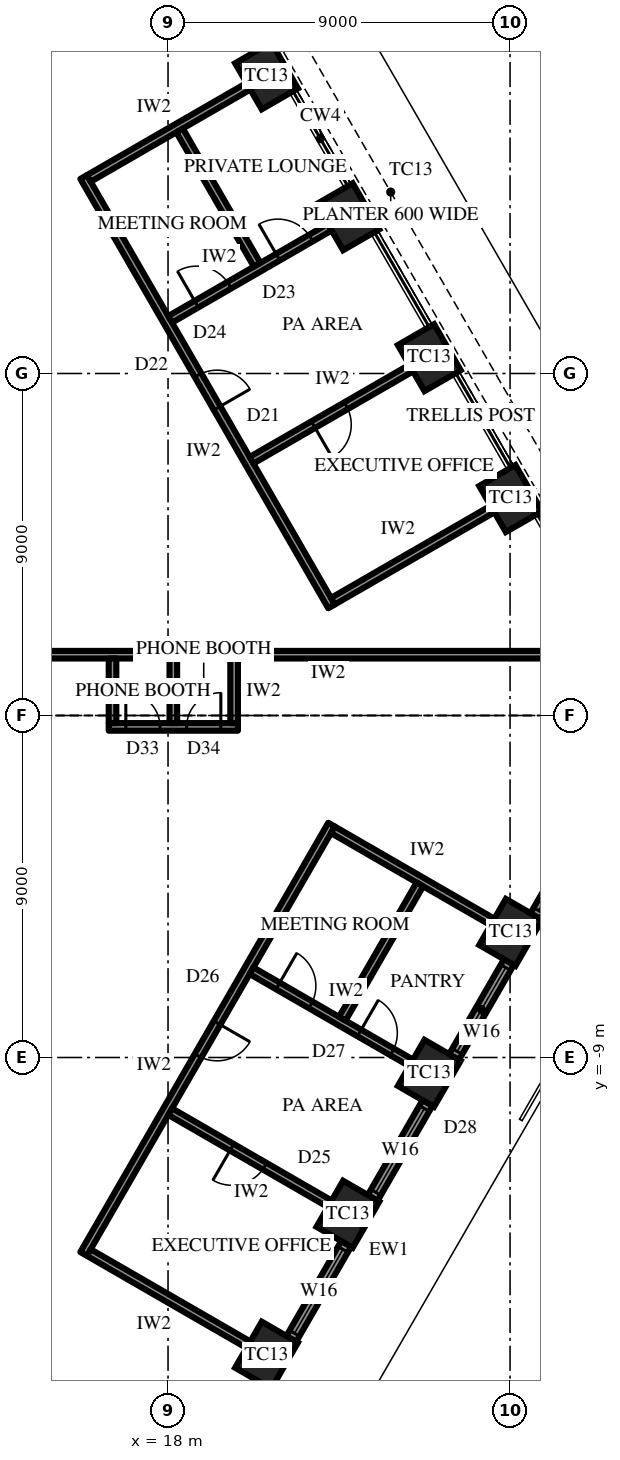
"""IFC4 building model, lengths in metres.
Left out: names, types, materials, properties, quantities, classifications, styles, units other than length and angle.
Written with IfcOpenShell. Run it as: python <this file> out.ifc"""

import sys

from ifc_helpers import new_model, si_unit, direction, frame, frame_2d, origin, origin_2d, place, context, subcontext, project, spatial, rectangle, extrude, element, fill, save


model = new_model("IFC4")
c1 = context("Model", 3, precision=1e-05, world=origin(), true_north=direction((0.0, 1.0)))
c2 = subcontext(c1, "Body", "Model", "MODEL_VIEW")
j1 = project(units=[si_unit("LENGTHUNIT", "METRE"), si_unit("PLANEANGLEUNIT", "RADIAN")], contexts=[c1])
p1 = place(None, origin())
s1 = spatial("IfcSite", under=j1, at=p1, CompositionType="ELEMENT")
p2 = place(p1, origin())
s2 = spatial("IfcBuilding", under=s1, at=p2, CompositionType="ELEMENT")
p3 = place(p2, frame((0.0, 0.0, 315.7)))
s3 = spatial("IfcBuildingStorey", under=s2, at=p3, CompositionType="ELEMENT", Elevation=315.7)
for number, where, z_axis, x_axis in (
    (1, (27.015, 5.708, 0.0), (0.0, 0.0, 1.0), (-0.5, 0.866, 0.0)),
    (2, (24.874, 9.417, 0.0), (0.0, 0.0, 1.0), (-0.5, 0.866, 0.0)),
    (3, (22.733, 13.125, 0.0), (0.0, 0.0, 1.0), (-0.5, 0.866, 0.0)),
    (4, (20.592, 16.833, 0.0), (0.0, 0.0, 1.0), (-0.5, 0.866, 0.0)),
    (5, (20.592, -16.833, 0.0), (0.0, 0.0, 1.0), (0.5, 0.866, 0.0)),
    (6, (22.733, -13.125, 0.0), (0.0, 0.0, 1.0), (0.5, 0.866, 0.0)),
    (7, (24.874, -9.417, 0.0), (0.0, 0.0, 1.0), (0.5, 0.866, 0.0)),
    (8, (27.015, -5.708, 0.0), (0.0, 0.0, 1.0), (0.5, 0.866, 0.0)),
):
    element("IfcColumn", number, at=place(p3, frame(where, z_axis=z_axis, x_axis=x_axis)), inside=s3, PredefinedType="COLUMN", context=c2, shape_type="SweptSolid", body=[
        extrude(rectangle(XDim=1.4, YDim=1.1, at=origin_2d()), origin(), (0.0, 0.0, 1.0), 4.2),
    ])
p4 = place(p3, frame((16.613, -24.425, 0.0), z_axis=(0.0, 0.0, 1.0), x_axis=(0.499997191038, 0.866027025533, 0.0)))
e9 = element("IfcWall", 9, at=p4, inside=s3, PredefinedType="SOLIDWALL", context=c2, shape_type="SweptSolid", body=[
    extrude(rectangle(XDim=25.692, YDim=0.3, at=frame_2d((12.846, 0.0))), origin(), (0.0, 0.0, 1.0), 2.0),
])
p5 = place(p4, frame((0.866, 0.0, 0.6)))
e10 = element("IfcOpeningElement", 10, at=p5, cuts=e9, PredefinedType="OPENING", context=c2, shape_type="SweptSolid", body=[
    extrude(rectangle(XDim=2.55, YDim=1.15, at=frame_2d((1.275, 0.575))), frame((0.0, 0.16, 0.0), z_axis=(0.0, -1.0, 0.0), x_axis=(1.0, 0.0, 0.0)), (0.0, 0.0, 1.0), 0.32),
])
p6 = place(p4, frame((5.148, 0.0, 0.6)))
e11 = element("IfcOpeningElement", 11, at=p6, cuts=e9, PredefinedType="OPENING", context=c2, shape_type="SweptSolid", body=[
    extrude(rectangle(XDim=2.55, YDim=1.15, at=frame_2d((1.275, 0.575))), frame((0.0, 0.16, 0.0), z_axis=(0.0, -1.0, 0.0), x_axis=(1.0, 0.0, 0.0)), (0.0, 0.0, 1.0), 0.32),
])
p7 = place(p4, frame((9.43, 0.0, 0.6)))
e12 = element("IfcOpeningElement", 12, at=p7, cuts=e9, PredefinedType="OPENING", context=c2, shape_type="SweptSolid", body=[
    extrude(rectangle(XDim=2.55, YDim=1.15, at=frame_2d((1.275, 0.575))), frame((0.0, 0.16, 0.0), z_axis=(0.0, -1.0, 0.0), x_axis=(1.0, 0.0, 0.0)), (0.0, 0.0, 1.0), 0.32),
])
p8 = place(p4, frame((13.712, 0.0, 0.6)))
e13 = element("IfcOpeningElement", 13, at=p8, cuts=e9, PredefinedType="OPENING", context=c2, shape_type="SweptSolid", body=[
    extrude(rectangle(XDim=2.55, YDim=1.15, at=frame_2d((1.275, 0.575))), frame((0.0, 0.16, 0.0), z_axis=(0.0, -1.0, 0.0), x_axis=(1.0, 0.0, 0.0)), (0.0, 0.0, 1.0), 0.32),
])
p9 = place(p4, frame((17.994, 0.0, 0.6)))
e14 = element("IfcOpeningElement", 14, at=p9, cuts=e9, PredefinedType="OPENING", context=c2, shape_type="SweptSolid", body=[
    extrude(rectangle(XDim=2.55, YDim=1.15, at=frame_2d((1.275, 0.575))), frame((0.0, 0.16, 0.0), z_axis=(0.0, -1.0, 0.0), x_axis=(1.0, 0.0, 0.0)), (0.0, 0.0, 1.0), 0.32),
])
p10 = place(p4, frame((22.276, 0.0, 0.6)))
e15 = element("IfcOpeningElement", 15, at=p10, cuts=e9, PredefinedType="OPENING", context=c2, shape_type="SweptSolid", body=[
    extrude(rectangle(XDim=2.55, YDim=1.15, at=frame_2d((1.275, 0.575))), frame((0.0, 0.16, 0.0), z_axis=(0.0, -1.0, 0.0), x_axis=(1.0, 0.0, 0.0)), (0.0, 0.0, 1.0), 0.32),
])
p11 = place(p3, frame((22.302, 2.872, 0.0), z_axis=(0.0, 0.0, 1.0), x_axis=(-0.499999460936, 0.866025715013, 0.0)))
e16 = element("IfcWall", 16, at=p11, inside=s3, PredefinedType="PARTITIONING", context=c2, shape_type="SweptSolid", body=[
    extrude(rectangle(XDim=13.046, YDim=0.2, at=frame_2d((6.523, 0.0))), origin(), (0.0, 0.0, 1.0), 4.0),
])
p12 = place(p11, frame((6.023, 0.0, 0.0)))
e17 = element("IfcOpeningElement", 17, at=p12, cuts=e16, PredefinedType="OPENING", context=c2, shape_type="SweptSolid", body=[
    extrude(rectangle(XDim=1.0, YDim=2.2, at=frame_2d((0.5, 1.1))), frame((0.0, 0.11, 0.0), z_axis=(0.0, -1.0, 0.0), x_axis=(1.0, 0.0, 0.0)), (0.0, 0.0, 1.0), 0.22),
])
p13 = place(p3, frame((22.339, 3.008, 0.0), z_axis=(0.0, 0.0, 1.0), x_axis=(0.866019606374, 0.500010041276, 0.0)))
e18 = element("IfcWall", 18, at=p13, inside=s3, PredefinedType="PARTITIONING", context=c2, shape_type="SweptSolid", body=[
    extrude(rectangle(XDim=4.85, YDim=0.2, at=frame_2d((2.425, 0.0))), origin(), (0.0, 0.0, 1.0), 3.082),
])
p14 = place(p3, frame((20.198, 6.717, 0.0), z_axis=(0.0, 0.0, 1.0), x_axis=(0.866019606374, 0.500010041276, 0.0)))
e19 = element("IfcWall", 19, at=p14, inside=s3, PredefinedType="PARTITIONING", context=c2, shape_type="SweptSolid", body=[
    extrude(rectangle(XDim=4.85, YDim=0.2, at=frame_2d((2.425, 0.0))), origin(), (0.0, 0.0, 1.0), 2.992),
])
p15 = place(p14, frame((1.875, 0.0, 0.0)))
e20 = element("IfcOpeningElement", 20, at=p15, cuts=e19, PredefinedType="OPENING", context=c2, shape_type="SweptSolid", body=[
    extrude(rectangle(XDim=1.0, YDim=2.2, at=frame_2d((0.5, 1.1))), frame((0.0, 0.11, 0.0), z_axis=(0.0, -1.0, 0.0), x_axis=(1.0, 0.0, 0.0)), (0.0, 0.0, 1.0), 0.22),
])
p16 = place(p3, frame((18.057, 10.425, 0.0), z_axis=(0.0, 0.0, 1.0), x_axis=(0.866019606374, 0.500010041276, 0.0)))
e21 = element("IfcWall", 21, at=p16, inside=s3, PredefinedType="PARTITIONING", context=c2, shape_type="SweptSolid", body=[
    extrude(rectangle(XDim=4.85, YDim=0.2, at=frame_2d((2.425, 0.0))), origin(), (0.0, 0.0, 1.0), 3.082),
])
p17 = place(p16, frame((0.8, 0.0, 0.0)))
e22 = element("IfcOpeningElement", 22, at=p17, cuts=e21, PredefinedType="OPENING", context=c2, shape_type="SweptSolid", body=[
    extrude(rectangle(XDim=1.0, YDim=2.2, at=frame_2d((0.5, 1.1))), frame((0.0, 0.11, 0.0), z_axis=(0.0, -1.0, 0.0), x_axis=(1.0, 0.0, 0.0)), (0.0, 0.0, 1.0), 0.22),
])
p18 = place(p16, frame((3.275, 0.0, 0.0)))
e23 = element("IfcOpeningElement", 23, at=p18, cuts=e21, PredefinedType="OPENING", context=c2, shape_type="SweptSolid", body=[
    extrude(rectangle(XDim=1.0, YDim=2.2, at=frame_2d((0.5, 1.1))), frame((0.0, 0.11, 0.0), z_axis=(0.0, -1.0, 0.0), x_axis=(1.0, 0.0, 0.0)), (0.0, 0.0, 1.0), 0.22),
])
p19 = place(p3, frame((15.916, 14.133, 0.0), z_axis=(0.0, 0.0, 1.0), x_axis=(0.866032190624, 0.499988244665, 0.0)))
e24 = element("IfcWall", 24, at=p19, inside=s3, PredefinedType="PARTITIONING", context=c2, shape_type="SweptSolid", body=[
    extrude(rectangle(XDim=4.85, YDim=0.2, at=frame_2d((2.425, 0.0))), origin(), (0.0, 0.0, 1.0), 3.082),
])
p20 = place(p3, frame((20.345, 11.862, 0.0), z_axis=(0.0, 0.0, 1.0), x_axis=(-0.499998569178, 0.866026229868, 0.0)))
e25 = element("IfcWall", 25, at=p20, inside=s3, PredefinedType="PARTITIONING", context=c2, shape_type="SweptSolid", body=[
    extrude(rectangle(XDim=4.082, YDim=0.2, at=frame_2d((2.041, 0.0))), origin(), (0.0, 0.0, 1.0), 4.0),
])
p21 = place(p3, frame((15.779, -14.17, 0.0), z_axis=(0.0, 0.0, 1.0), x_axis=(0.499999460936, 0.866025715013, 0.0)))
e26 = element("IfcWall", 26, at=p21, inside=s3, PredefinedType="PARTITIONING", context=c2, shape_type="SweptSolid", body=[
    extrude(rectangle(XDim=13.046, YDim=0.2, at=frame_2d((6.523, 0.0))), origin(), (0.0, 0.0, 1.0), 4.0),
])
p22 = place(p21, frame((6.023, 0.0, 0.0)))
e27 = element("IfcOpeningElement", 27, at=p22, cuts=e26, PredefinedType="OPENING", context=c2, shape_type="SweptSolid", body=[
    extrude(rectangle(XDim=1.0, YDim=2.2, at=frame_2d((0.5, 1.1))), frame((0.0, 0.11, 0.0), z_axis=(0.0, -1.0, 0.0), x_axis=(1.0, 0.0, 0.0)), (0.0, 0.0, 1.0), 0.22),
])
p23 = place(p3, frame((15.916, -14.133, 0.0), z_axis=(0.0, 0.0, 1.0), x_axis=(0.866032190624, -0.499988244665, 0.0)))
e28 = element("IfcWall", 28, at=p23, inside=s3, PredefinedType="PARTITIONING", context=c2, shape_type="SweptSolid", body=[
    extrude(rectangle(XDim=4.85, YDim=0.2, at=frame_2d((2.425, 0.0))), origin(), (0.0, 0.0, 1.0), 3.082),
])
p24 = place(p3, frame((18.057, -10.425, 0.0), z_axis=(0.0, 0.0, 1.0), x_axis=(0.866019606374, -0.500010041276, 0.0)))
e29 = element("IfcWall", 29, at=p24, inside=s3, PredefinedType="PARTITIONING", context=c2, shape_type="SweptSolid", body=[
    extrude(rectangle(XDim=4.85, YDim=0.2, at=frame_2d((2.425, 0.0))), origin(), (0.0, 0.0, 1.0), 3.082),
])
p25 = place(p24, frame((1.875, 0.0, 0.0)))
e30 = element("IfcOpeningElement", 30, at=p25, cuts=e29, PredefinedType="OPENING", context=c2, shape_type="SweptSolid", body=[
    extrude(rectangle(XDim=1.0, YDim=2.2, at=frame_2d((0.5, 1.1))), frame((0.0, 0.11, 0.0), z_axis=(0.0, -1.0, 0.0), x_axis=(1.0, 0.0, 0.0)), (0.0, 0.0, 1.0), 0.22),
])
p26 = place(p3, frame((20.198, -6.717, 0.0), z_axis=(0.0, 0.0, 1.0), x_axis=(0.866019606374, -0.500010041276, 0.0)))
e31 = element("IfcWall", 31, at=p26, inside=s3, PredefinedType="PARTITIONING", context=c2, shape_type="SweptSolid", body=[
    extrude(rectangle(XDim=4.85, YDim=0.2, at=frame_2d((2.425, 0.0))), origin(), (0.0, 0.0, 1.0), 2.992),
])
p27 = place(p26, frame((0.8, 0.0, 0.0)))
e32 = element("IfcOpeningElement", 32, at=p27, cuts=e31, PredefinedType="OPENING", context=c2, shape_type="SweptSolid", body=[
    extrude(rectangle(XDim=1.0, YDim=2.2, at=frame_2d((0.5, 1.1))), frame((0.0, 0.11, 0.0), z_axis=(0.0, -1.0, 0.0), x_axis=(1.0, 0.0, 0.0)), (0.0, 0.0, 1.0), 0.22),
])
p28 = place(p26, frame((3.275, 0.0, 0.0)))
e33 = element("IfcOpeningElement", 33, at=p28, cuts=e31, PredefinedType="OPENING", context=c2, shape_type="SweptSolid", body=[
    extrude(rectangle(XDim=1.0, YDim=2.2, at=frame_2d((0.5, 1.1))), frame((0.0, 0.11, 0.0), z_axis=(0.0, -1.0, 0.0), x_axis=(1.0, 0.0, 0.0)), (0.0, 0.0, 1.0), 0.22),
])
p29 = place(p3, frame((22.339, -3.008, 0.0), z_axis=(0.0, 0.0, 1.0), x_axis=(0.866019606374, -0.500010041276, 0.0)))
e34 = element("IfcWall", 34, at=p29, inside=s3, PredefinedType="PARTITIONING", context=c2, shape_type="SweptSolid", body=[
    extrude(rectangle(XDim=4.85, YDim=0.2, at=frame_2d((2.425, 0.0))), origin(), (0.0, 0.0, 1.0), 3.082),
])
p30 = place(p3, frame((22.586, -7.98, 0.0), z_axis=(0.0, 0.0, 1.0), x_axis=(0.499998569178, 0.866026229868, 0.0)))
e35 = element("IfcWall", 35, at=p30, inside=s3, PredefinedType="PARTITIONING", context=c2, shape_type="SweptSolid", body=[
    extrude(rectangle(XDim=4.082, YDim=0.2, at=frame_2d((2.041, 0.0))), origin(), (0.0, 0.0, 1.0), 4.0),
])
p31 = place(p3, frame((12.425, 1.6, 0.0), z_axis=(0.0, 0.0, 1.0), x_axis=(1.0, 0.0, 0.0)))
e36 = element("IfcWall", 36, at=p31, inside=s3, PredefinedType="PARTITIONING", context=c2, shape_type="SweptSolid", body=[
    extrude(rectangle(XDim=16.327, YDim=0.2, at=frame_2d((8.164, 0.0))), origin(), (0.0, 0.0, 1.0), 4.0),
])
p32 = place(p31, frame((1.133, 0.0, 0.0)))
e37 = element("IfcOpeningElement", 37, at=p32, cuts=e36, PredefinedType="OPENING", context=c2, shape_type="SweptSolid", body=[
    extrude(rectangle(XDim=1.0, YDim=2.2, at=frame_2d((0.5, 1.1))), frame((0.0, 0.11, 0.0), z_axis=(0.0, -1.0, 0.0), x_axis=(1.0, 0.0, 0.0)), (0.0, 0.0, 1.0), 0.22),
])
p33 = place(p3, frame((16.439, -0.3, 0.0), z_axis=(0.0, 0.0, 1.0), x_axis=(1.0, 0.0, 0.0)))
e38 = element("IfcWall", 38, at=p33, inside=s3, PredefinedType="PARTITIONING", context=c2, shape_type="SweptSolid", body=[
    extrude(rectangle(XDim=3.4, YDim=0.2, at=frame_2d((1.7, 0.0))), origin(), (0.0, 0.0, 1.0), 4.0),
])
p34 = place(p33, frame((0.45, 0.0, 0.0)))
e39 = element("IfcOpeningElement", 39, at=p34, cuts=e38, PredefinedType="OPENING", context=c2, shape_type="SweptSolid", body=[
    extrude(rectangle(XDim=0.9, YDim=2.2, at=frame_2d((0.45, 1.1))), frame((0.0, 0.11, 0.0), z_axis=(0.0, -1.0, 0.0), x_axis=(1.0, 0.0, 0.0)), (0.0, 0.0, 1.0), 0.22),
])
p35 = place(p33, frame((2.05, 0.0, 0.0)))
e40 = element("IfcOpeningElement", 40, at=p35, cuts=e38, PredefinedType="OPENING", context=c2, shape_type="SweptSolid", body=[
    extrude(rectangle(XDim=0.9, YDim=2.2, at=frame_2d((0.45, 1.1))), frame((0.0, 0.11, 0.0), z_axis=(0.0, -1.0, 0.0), x_axis=(1.0, 0.0, 0.0)), (0.0, 0.0, 1.0), 0.22),
])
for number, where, z_axis, x_axis in (
    (41, (16.54, 1.5, 0.0), (0.0, 0.0, 1.0), (0.0, -1.0, 0.0)),
    (42, (18.139, 1.5, 0.0), (0.0, 0.0, 1.0), (0.0, -1.0, 0.0)),
    (43, (19.74, 1.5, 0.0), (0.0, 0.0, 1.0), (0.0, -1.0, 0.0)),
):
    element("IfcWall", number, at=place(p3, frame(where, z_axis=z_axis, x_axis=x_axis)), inside=s3, PredefinedType="PARTITIONING", context=c2, shape_type="SweptSolid", body=[
        extrude(rectangle(XDim=1.7, YDim=0.2, at=frame_2d((0.85, 0.0))), origin(), (0.0, 0.0, 1.0), 4.0),
    ])
p36 = place(p7, origin())
e44 = element("IfcWindow", 44, at=p36, inside=s3, PartitioningType="SINGLE_PANEL", PredefinedType="WINDOW", context=c2, shape_type="SweptSolid", body=[
    extrude(rectangle(XDim=2.55, YDim=1.15, at=frame_2d((1.275, 0.575))), frame((0.0, 0.03, 0.0), z_axis=(0.0, -1.0, 0.0), x_axis=(1.0, 0.0, 0.0)), (0.0, 0.0, 1.0), 0.06),
])
fill(e12, e44)
p37 = place(p8, origin())
e45 = element("IfcWindow", 45, at=p37, inside=s3, PartitioningType="SINGLE_PANEL", PredefinedType="WINDOW", context=c2, shape_type="SweptSolid", body=[
    extrude(rectangle(XDim=2.55, YDim=1.15, at=frame_2d((1.275, 0.575))), frame((0.0, 0.03, 0.0), z_axis=(0.0, -1.0, 0.0), x_axis=(1.0, 0.0, 0.0)), (0.0, 0.0, 1.0), 0.06),
])
fill(e13, e45)
p38 = place(p9, origin())
e46 = element("IfcWindow", 46, at=p38, inside=s3, PartitioningType="SINGLE_PANEL", PredefinedType="WINDOW", context=c2, shape_type="SweptSolid", body=[
    extrude(rectangle(XDim=2.55, YDim=1.15, at=frame_2d((1.275, 0.575))), frame((0.0, 0.03, 0.0), z_axis=(0.0, -1.0, 0.0), x_axis=(1.0, 0.0, 0.0)), (0.0, 0.0, 1.0), 0.06),
])
fill(e14, e46)
p39 = place(p10, origin())
e47 = element("IfcWindow", 47, at=p39, inside=s3, PartitioningType="SINGLE_PANEL", PredefinedType="WINDOW", context=c2, shape_type="SweptSolid", body=[
    extrude(rectangle(XDim=2.55, YDim=1.15, at=frame_2d((1.275, 0.575))), frame((0.0, 0.03, 0.0), z_axis=(0.0, -1.0, 0.0), x_axis=(1.0, 0.0, 0.0)), (0.0, 0.0, 1.0), 0.06),
])
fill(e15, e47)
p40 = place(p15, frame((1.0, 0.0, 0.0), z_axis=(0.0, 0.0, 1.0), x_axis=(-1.0, 0.0, 0.0)))
e48 = element("IfcDoor", 48, at=p40, inside=s3, OperationType="SINGLE_SWING_LEFT", PredefinedType="DOOR", context=c2, shape_type="SweptSolid", body=[
    extrude(rectangle(XDim=1.0, YDim=2.2, at=frame_2d((0.5, 1.1))), frame((0.0, 0.025, 0.0), z_axis=(0.0, -1.0, 0.0), x_axis=(1.0, 0.0, 0.0)), (0.0, 0.0, 1.0), 0.05),
])
fill(e20, e48)
p41 = place(p12, frame((1.0, 0.0, 0.0), z_axis=(0.0, 0.0, 1.0), x_axis=(-1.0, 0.0, 0.0)))
e49 = element("IfcDoor", 49, at=p41, inside=s3, OperationType="SINGLE_SWING_LEFT", PredefinedType="DOOR", context=c2, shape_type="SweptSolid", body=[
    extrude(rectangle(XDim=1.0, YDim=2.2, at=frame_2d((0.5, 1.1))), frame((0.0, 0.025, 0.0), z_axis=(0.0, -1.0, 0.0), x_axis=(1.0, 0.0, 0.0)), (0.0, 0.0, 1.0), 0.05),
])
fill(e17, e49)
p42 = place(p17, origin())
e50 = element("IfcDoor", 50, at=p42, inside=s3, OperationType="SINGLE_SWING_RIGHT", PredefinedType="DOOR", context=c2, shape_type="SweptSolid", body=[
    extrude(rectangle(XDim=1.0, YDim=2.2, at=frame_2d((0.5, 1.1))), frame((0.0, 0.025, 0.0), z_axis=(0.0, -1.0, 0.0), x_axis=(1.0, 0.0, 0.0)), (0.0, 0.0, 1.0), 0.05),
])
fill(e22, e50)
p43 = place(p18, origin())
e51 = element("IfcDoor", 51, at=p43, inside=s3, OperationType="SINGLE_SWING_RIGHT", PredefinedType="DOOR", context=c2, shape_type="SweptSolid", body=[
    extrude(rectangle(XDim=1.0, YDim=2.2, at=frame_2d((0.5, 1.1))), frame((0.0, 0.025, 0.0), z_axis=(0.0, -1.0, 0.0), x_axis=(1.0, 0.0, 0.0)), (0.0, 0.0, 1.0), 0.05),
])
fill(e23, e51)
p44 = place(p25, frame((1.0, 0.0, 0.0), z_axis=(0.0, 0.0, 1.0), x_axis=(-1.0, 0.0, 0.0)))
e52 = element("IfcDoor", 52, at=p44, inside=s3, OperationType="SINGLE_SWING_LEFT", PredefinedType="DOOR", context=c2, shape_type="SweptSolid", body=[
    extrude(rectangle(XDim=1.0, YDim=2.2, at=frame_2d((0.5, 1.1))), frame((0.0, 0.025, 0.0), z_axis=(0.0, -1.0, 0.0), x_axis=(1.0, 0.0, 0.0)), (0.0, 0.0, 1.0), 0.05),
])
fill(e30, e52)
p45 = place(p22, frame((1.0, 0.0, 0.0), z_axis=(0.0, 0.0, 1.0), x_axis=(-1.0, 0.0, 0.0)))
e53 = element("IfcDoor", 53, at=p45, inside=s3, OperationType="SINGLE_SWING_RIGHT", PredefinedType="DOOR", context=c2, shape_type="SweptSolid", body=[
    extrude(rectangle(XDim=1.0, YDim=2.2, at=frame_2d((0.5, 1.1))), frame((0.0, 0.025, 0.0), z_axis=(0.0, -1.0, 0.0), x_axis=(1.0, 0.0, 0.0)), (0.0, 0.0, 1.0), 0.05),
])
fill(e27, e53)
p46 = place(p27, origin())
e54 = element("IfcDoor", 54, at=p46, inside=s3, OperationType="SINGLE_SWING_RIGHT", PredefinedType="DOOR", context=c2, shape_type="SweptSolid", body=[
    extrude(rectangle(XDim=1.0, YDim=2.2, at=frame_2d((0.5, 1.1))), frame((0.0, 0.025, 0.0), z_axis=(0.0, -1.0, 0.0), x_axis=(1.0, 0.0, 0.0)), (0.0, 0.0, 1.0), 0.05),
])
fill(e32, e54)
p47 = place(p28, origin())
e55 = element("IfcDoor", 55, at=p47, inside=s3, OperationType="SINGLE_SWING_RIGHT", PredefinedType="DOOR", context=c2, shape_type="SweptSolid", body=[
    extrude(rectangle(XDim=1.0, YDim=2.2, at=frame_2d((0.5, 1.1))), frame((0.0, 0.025, 0.0), z_axis=(0.0, -1.0, 0.0), x_axis=(1.0, 0.0, 0.0)), (0.0, 0.0, 1.0), 0.05),
])
fill(e33, e55)
p48 = place(p34, origin())
e56 = element("IfcDoor", 56, at=p48, inside=s3, OperationType="SINGLE_SWING_RIGHT", PredefinedType="DOOR", context=c2, shape_type="SweptSolid", body=[
    extrude(rectangle(XDim=0.9, YDim=2.2, at=frame_2d((0.45, 1.1))), frame((0.0, 0.025, 0.0), z_axis=(0.0, -1.0, 0.0), x_axis=(1.0, 0.0, 0.0)), (0.0, 0.0, 1.0), 0.05),
])
fill(e39, e56)
p49 = place(p35, origin())
e57 = element("IfcDoor", 57, at=p49, inside=s3, OperationType="SINGLE_SWING_LEFT", PredefinedType="DOOR", context=c2, shape_type="SweptSolid", body=[
    extrude(rectangle(XDim=0.9, YDim=2.2, at=frame_2d((0.45, 1.1))), frame((0.0, 0.025, 0.0), z_axis=(0.0, -1.0, 0.0), x_axis=(1.0, 0.0, 0.0)), (0.0, 0.0, 1.0), 0.05),
])
fill(e40, e57)
save(model, sys.argv[1])
